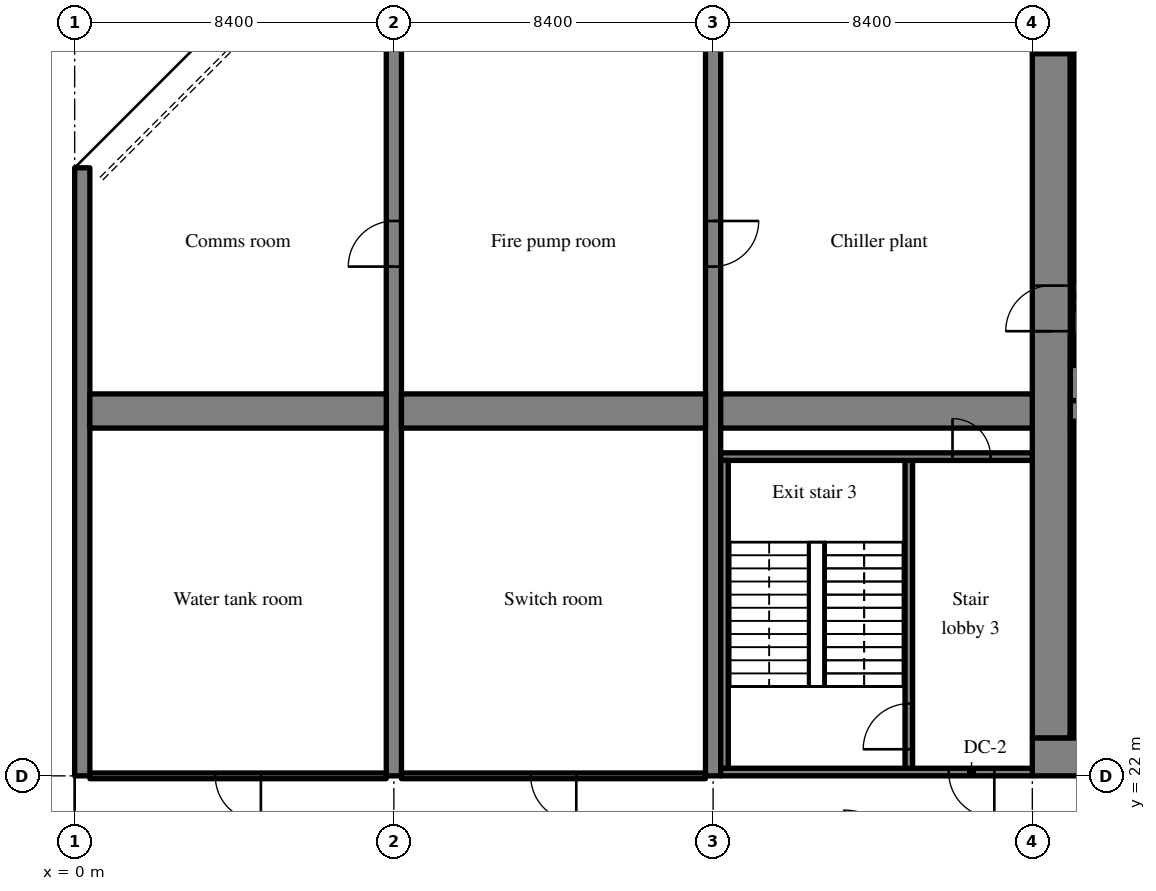
"""IFC4 building model, lengths in metres.
Left out: names, types, materials, properties, quantities, classifications, styles, units other than length and angle.
Written with IfcOpenShell. Run it as: python <this file> out.ifc"""

import sys

from ifc_helpers import new_model, si_unit, direction, frame, frame_2d, origin, place, context, subcontext, project, spatial, rectangle, extrude, source, transform, mapped, element, fill, save


model = new_model("IFC4")
c1 = context("Model", 3, precision=1e-05, world=origin(), true_north=direction((0.0, 1.0)))
c2 = subcontext(c1, "Body", "Model", "MODEL_VIEW")
j1 = project(units=[si_unit("LENGTHUNIT", "METRE"), si_unit("PLANEANGLEUNIT", "RADIAN")], contexts=[c1])
p1 = place(None, origin())
s1 = spatial("IfcSite", under=j1, at=p1, CompositionType="ELEMENT")
p2 = place(p1, origin())
s2 = spatial("IfcBuilding", under=s1, at=p2, CompositionType="ELEMENT")
p3 = place(p2, frame((0.0, 0.0, 81.0)))
s3 = spatial("IfcBuildingStorey", under=s2, at=p3, CompositionType="ELEMENT", Elevation=81.0)
m1 = source(origin(), c2, "Body", "SweptSolid", [
    extrude(rectangle(XDim=50.4, YDim=1.0, at=frame_2d((25.2, 0.0))), origin(), (0.0, 0.0, 1.0), 5.12),
])
p4 = place(p3, frame((25.2, 22.5, 0.0), z_axis=(0.0, 0.0, 1.0), x_axis=(1.0, 0.0, 0.0)))
e1 = element("IfcWall", 1, at=p4, inside=s3, PredefinedType="SHEAR", context=c2, shape_type="MappedRepresentation", body=[
    mapped(m1, transform((0.0, 0.0, 0.0), scale=1.0)),
])
m2 = source(origin(), c2, "Body", "SweptSolid", [
    extrude(rectangle(XDim=1.8, YDim=2.1, at=frame_2d((0.9, 1.05))), frame((0.0, 0.51, 0.0), z_axis=(0.0, -1.0, 0.0), x_axis=(1.0, 0.0, 0.0)), (0.0, 0.0, 1.0), 1.02),
])
p5 = place(p4, frame((15.9, 0.0, 0.0)))
e2 = element("IfcOpeningElement", 2, at=p5, cuts=e1, PredefinedType="OPENING", context=c2, shape_type="MappedRepresentation", body=[
    mapped(m2, transform((0.0, 0.0, 0.0), scale=1.0)),
])
m3 = source(origin(), c2, "Body", "SweptSolid", [
    extrude(rectangle(XDim=1.2, YDim=2.1, at=frame_2d((0.6, 1.05))), frame((0.0, 0.51, 0.0), z_axis=(0.0, -1.0, 0.0), x_axis=(1.0, 0.0, 0.0)), (0.0, 0.0, 1.0), 1.02),
])
p6 = place(p4, frame((26.987, 0.0, 0.0)))
e3 = element("IfcOpeningElement", 3, at=p6, cuts=e1, PredefinedType="OPENING", context=c2, shape_type="MappedRepresentation", body=[
    mapped(m3, transform((0.0, 0.0, 0.0), scale=1.0)),
])
m4 = source(origin(), c2, "Body", "SweptSolid", [
    extrude(rectangle(XDim=0.9, YDim=2.1, at=frame_2d((0.45, 1.05))), frame((0.0, 0.51, 0.0), z_axis=(0.0, -1.0, 0.0), x_axis=(1.0, 0.0, 0.0)), (0.0, 0.0, 1.0), 1.02),
])
p7 = place(p4, frame((33.75, 0.0, 0.0)))
e4 = element("IfcOpeningElement", 4, at=p7, cuts=e1, PredefinedType="OPENING", context=c2, shape_type="MappedRepresentation", body=[
    mapped(m4, transform((0.0, 0.0, 0.0), scale=1.0)),
])
p8 = place(p4, frame((30.75, 0.0, 0.0)))
e5 = element("IfcOpeningElement", 5, at=p8, cuts=e1, PredefinedType="OPENING", context=c2, shape_type="MappedRepresentation", body=[
    mapped(m4, transform((0.0, 0.0, 0.0), scale=1.0)),
])
p9 = place(p4, frame((38.262, 0.0, 0.0)))
e6 = element("IfcOpeningElement", 6, at=p9, cuts=e1, PredefinedType="OPENING", context=c2, shape_type="MappedRepresentation", body=[
    mapped(m4, transform((0.0, 0.0, 0.0), scale=1.0)),
])
p10 = place(p4, frame((6.438, 0.0, 0.0)))
e7 = element("IfcOpeningElement", 7, at=p10, cuts=e1, PredefinedType="OPENING", context=c2, shape_type="MappedRepresentation", body=[
    mapped(m3, transform((0.0, 0.0, 0.0), scale=1.0)),
])
p11 = place(p4, frame((47.725, 0.0, 0.0)))
e8 = element("IfcOpeningElement", 8, at=p11, cuts=e1, PredefinedType="OPENING", context=c2, shape_type="MappedRepresentation", body=[
    mapped(m3, transform((0.0, 0.0, 0.0), scale=1.0)),
])
p12 = place(p3, frame((25.2, 41.5, 0.0), z_axis=(0.0, 0.0, 1.0), x_axis=(1.0, 0.0, 0.0)))
e9 = element("IfcWall", 9, at=p12, inside=s3, PredefinedType="SHEAR", context=c2, shape_type="MappedRepresentation", body=[
    mapped(m1, transform((0.0, 0.0, 0.0), scale=1.0)),
])
m5 = source(origin(), c2, "Body", "SweptSolid", [
    extrude(rectangle(XDim=18.0, YDim=1.0, at=frame_2d((9.0, 0.0))), origin(), (0.0, 0.0, 1.0), 5.12),
])
p13 = place(p3, frame((25.7, 23.0, 0.0), z_axis=(0.0, 0.0, 1.0), x_axis=(0.0, 1.0, 0.0)))
e10 = element("IfcWall", 10, at=p13, inside=s3, PredefinedType="SHEAR", context=c2, shape_type="MappedRepresentation", body=[
    mapped(m5, transform((0.0, 0.0, 0.0), scale=1.0)),
])
p14 = place(p13, frame((10.7, 0.0, 0.0)))
e11 = element("IfcOpeningElement", 11, at=p14, cuts=e10, PredefinedType="OPENING", context=c2, shape_type="MappedRepresentation", body=[
    mapped(m3, transform((0.0, 0.0, 0.0), scale=1.0)),
])
m6 = source(origin(), c2, "Body", "SweptSolid", [
    extrude(rectangle(XDim=7.125, YDim=0.55, at=frame_2d((3.562, 0.0))), origin(), (0.0, 0.0, 1.0), 5.12),
])
p15 = place(p3, frame((26.2, 31.6, 0.0), z_axis=(0.0, 0.0, 1.0), x_axis=(1.0, 0.0, 0.0)))
e12 = element("IfcWall", 12, at=p15, inside=s3, PredefinedType="SHEAR", context=c2, shape_type="MappedRepresentation", body=[
    mapped(m6, transform((0.0, 0.0, 0.0), scale=1.0)),
])
m7 = source(origin(), c2, "Body", "SweptSolid", [
    extrude(rectangle(XDim=1.1, YDim=2.1, at=frame_2d((0.55, 1.05))), frame((0.0, 0.285, 0.0), z_axis=(0.0, -1.0, 0.0), x_axis=(1.0, 0.0, 0.0)), (0.0, 0.0, 1.0), 0.57),
])
p16 = place(p15, frame((5.488, 0.0, 0.0)))
e13 = element("IfcOpeningElement", 13, at=p16, cuts=e12, PredefinedType="OPENING", context=c2, shape_type="MappedRepresentation", body=[
    mapped(m7, transform((0.0, 0.0, 0.0), scale=1.0)),
])
m8 = source(origin(), c2, "Body", "SweptSolid", [
    extrude(rectangle(XDim=16.0, YDim=0.4, at=frame_2d((8.0, 0.0))), origin(), (0.0, 0.0, 1.0), 5.12),
])
p17 = place(p3, frame((0.2, 22.0, 0.0), z_axis=(0.0, 0.0, 1.0), x_axis=(0.0, 1.0, 0.0)))
e14 = element("IfcWall", 14, at=p17, inside=s3, PredefinedType="SHEAR", context=c2, shape_type="MappedRepresentation", body=[
    mapped(m8, transform((0.0, 0.0, 0.0), scale=1.0)),
])
m9 = source(origin(), c2, "Body", "SweptSolid", [
    extrude(rectangle(XDim=20.0, YDim=0.4, at=frame_2d((10.0, 0.0))), origin(), (0.0, 0.0, 1.0), 5.12),
])
p18 = place(p3, frame((8.4, 22.0, 0.0), z_axis=(0.0, 0.0, 1.0), x_axis=(0.0, 1.0, 0.0)))
e15 = element("IfcWall", 15, at=p18, inside=s3, PredefinedType="SHEAR", context=c2, shape_type="MappedRepresentation", body=[
    mapped(m9, transform((0.0, 0.0, 0.0), scale=1.0)),
])
m10 = source(origin(), c2, "Body", "SweptSolid", [
    extrude(rectangle(XDim=1.2, YDim=2.1, at=frame_2d((0.6, 1.05))), frame((0.0, 0.21, 0.0), z_axis=(0.0, -1.0, 0.0), x_axis=(1.0, 0.0, 0.0)), (0.0, 0.0, 1.0), 0.42),
])
p19 = place(p18, frame((13.4, 0.0, 0.0)))
e16 = element("IfcOpeningElement", 16, at=p19, cuts=e15, PredefinedType="OPENING", context=c2, shape_type="MappedRepresentation", body=[
    mapped(m10, transform((0.0, 0.0, 0.0), scale=1.0)),
])
p20 = place(p3, frame((16.8, 22.0, 0.0), z_axis=(0.0, 0.0, 1.0), x_axis=(0.0, 1.0, 0.0)))
e17 = element("IfcWall", 17, at=p20, inside=s3, PredefinedType="SHEAR", context=c2, shape_type="MappedRepresentation", body=[
    mapped(m9, transform((0.0, 0.0, 0.0), scale=1.0)),
])
p21 = place(p20, frame((13.4, 0.0, 0.0)))
e18 = element("IfcOpeningElement", 18, at=p21, cuts=e17, PredefinedType="OPENING", context=c2, shape_type="MappedRepresentation", body=[
    mapped(m10, transform((0.0, 0.0, 0.0), scale=1.0)),
])
m11 = source(origin(), c2, "Body", "SweptSolid", [
    extrude(rectangle(XDim=7.8, YDim=0.9, at=frame_2d((3.9, 0.0))), origin(), (0.0, 0.0, 1.0), 5.12),
])
p22 = place(p3, frame((0.4, 31.6, 0.0), z_axis=(0.0, 0.0, 1.0), x_axis=(1.0, 0.0, 0.0)))
e19 = element("IfcWall", 19, at=p22, inside=s3, PredefinedType="SHEAR", context=c2, shape_type="MappedRepresentation", body=[
    mapped(m11, transform((0.0, 0.0, 0.0), scale=1.0)),
])
m12 = source(origin(), c2, "Body", "SweptSolid", [
    extrude(rectangle(XDim=8.0, YDim=0.9, at=frame_2d((4.0, 0.0))), origin(), (0.0, 0.0, 1.0), 5.12),
])
p23 = place(p3, frame((8.6, 31.6, 0.0), z_axis=(0.0, 0.0, 1.0), x_axis=(1.0, 0.0, 0.0)))
e20 = element("IfcWall", 20, at=p23, inside=s3, PredefinedType="SHEAR", context=c2, shape_type="MappedRepresentation", body=[
    mapped(m12, transform((0.0, 0.0, 0.0), scale=1.0)),
])
m13 = source(origin(), c2, "Body", "SweptSolid", [
    extrude(rectangle(XDim=8.2, YDim=0.9, at=frame_2d((4.1, 0.0))), origin(), (0.0, 0.0, 1.0), 5.12),
])
p24 = place(p3, frame((17.0, 31.6, 0.0), z_axis=(0.0, 0.0, 1.0), x_axis=(1.0, 0.0, 0.0)))
e21 = element("IfcWall", 21, at=p24, inside=s3, PredefinedType="SHEAR", context=c2, shape_type="MappedRepresentation", body=[
    mapped(m13, transform((0.0, 0.0, 0.0), scale=1.0)),
])
m14 = source(origin(), c2, "Body", "SweptSolid", [
    extrude(rectangle(XDim=8.3, YDim=0.2, at=frame_2d((4.15, 0.0))), origin(), (0.0, 0.0, 1.0), 5.12),
])
p25 = place(p3, frame((21.95, 22.1, 0.0), z_axis=(0.0, 0.0, 1.0), x_axis=(0.0, 1.0, 0.0)))
e22 = element("IfcWall", 22, at=p25, inside=s3, PredefinedType="SOLIDWALL", context=c2, shape_type="MappedRepresentation", body=[
    mapped(m14, transform((0.0, 0.0, 0.0), scale=1.0)),
])
m15 = source(origin(), c2, "Body", "SweptSolid", [
    extrude(rectangle(XDim=1.2, YDim=2.1, at=frame_2d((0.6, 1.05))), frame((0.0, 0.11, 0.0), z_axis=(0.0, -1.0, 0.0), x_axis=(1.0, 0.0, 0.0)), (0.0, 0.0, 1.0), 0.22),
])
p26 = place(p25, frame((0.6, 0.0, 0.0)))
e23 = element("IfcOpeningElement", 23, at=p26, cuts=e22, PredefinedType="OPENING", context=c2, shape_type="MappedRepresentation", body=[
    mapped(m15, transform((0.0, 0.0, 0.0), scale=1.0)),
])
m16 = source(origin(), c2, "Body", "SweptSolid", [
    extrude(rectangle(XDim=8.2, YDim=0.2, at=frame_2d((4.1, 0.0))), origin(), (0.0, 0.0, 1.0), 5.12),
])
p27 = place(p3, frame((17.0, 22.1, 0.0), z_axis=(0.0, 0.0, 1.0), x_axis=(1.0, 0.0, 0.0)))
e24 = element("IfcWall", 24, at=p27, inside=s3, PredefinedType="SOLIDWALL", context=c2, shape_type="MappedRepresentation", body=[
    mapped(m16, transform((0.0, 0.0, 0.0), scale=1.0)),
])
p28 = place(p27, frame((6.0, 0.0, 0.0)))
e25 = element("IfcOpeningElement", 25, at=p28, cuts=e24, PredefinedType="OPENING", context=c2, shape_type="MappedRepresentation", body=[
    mapped(m15, transform((0.0, 0.0, 0.0), scale=1.0)),
])
p29 = place(p3, frame((25.2, 30.4, 0.0), z_axis=(0.0, 0.0, 1.0), x_axis=(-1.0, 0.0, 0.0)))
e26 = element("IfcWall", 26, at=p29, inside=s3, PredefinedType="SOLIDWALL", context=c2, shape_type="MappedRepresentation", body=[
    mapped(m16, transform((0.0, 0.0, 0.0), scale=1.0)),
])
m17 = source(origin(), c2, "Body", "SweptSolid", [
    extrude(rectangle(XDim=1.0, YDim=2.1, at=frame_2d((0.5, 1.05))), frame((0.0, 0.11, 0.0), z_axis=(0.0, -1.0, 0.0), x_axis=(1.0, 0.0, 0.0)), (0.0, 0.0, 1.0), 0.22),
])
p30 = place(p29, frame((1.1, 0.0, 0.0)))
e27 = element("IfcOpeningElement", 27, at=p30, cuts=e26, PredefinedType="OPENING", context=c2, shape_type="MappedRepresentation", body=[
    mapped(m17, transform((0.0, 0.0, 0.0), scale=1.0)),
])
m18 = source(origin(), c2, "Body", "SweptSolid", [
    extrude(rectangle(XDim=4.75, YDim=0.1, at=frame_2d((2.375, 0.0))), origin(), (0.0, 0.0, 1.0), 5.12),
])
p31 = place(p3, frame((26.2, 23.05, 0.0), z_axis=(0.0, 0.0, 1.0), x_axis=(1.0, 0.0, 0.0)))
e28 = element("IfcWall", 28, at=p31, inside=s3, PredefinedType="SOLIDWALL", context=c2, shape_type="MappedRepresentation", body=[
    mapped(m18, transform((0.0, 0.0, 0.0), scale=1.0)),
])
m19 = source(origin(), c2, "Body", "SweptSolid", [
    extrude(rectangle(XDim=4.75, YDim=0.125, at=frame_2d((2.375, 0.0))), origin(), (0.0, 0.0, 1.0), 5.12),
])
p32 = place(p3, frame((26.2, 31.262, 0.0), z_axis=(0.0, 0.0, 1.0), x_axis=(1.0, 0.0, 0.0)))
e29 = element("IfcWall", 29, at=p32, inside=s3, PredefinedType="SOLIDWALL", context=c2, shape_type="MappedRepresentation", body=[
    mapped(m19, transform((0.0, 0.0, 0.0), scale=1.0)),
])
m20 = source(origin(), c2, "Body", "SweptSolid", [
    extrude(rectangle(XDim=8.1, YDim=0.1, at=frame_2d((4.05, 0.0))), origin(), (0.0, 0.0, 1.0), 5.12),
])
p33 = place(p3, frame((26.25, 23.1, 0.0), z_axis=(0.0, 0.0, 1.0), x_axis=(0.0, 1.0, 0.0)))
e30 = element("IfcWall", 30, at=p33, inside=s3, PredefinedType="SOLIDWALL", context=c2, shape_type="MappedRepresentation", body=[
    mapped(m20, transform((0.0, 0.0, 0.0), scale=1.0)),
])
m21 = source(origin(), c2, "Body", "SweptSolid", [
    extrude(rectangle(XDim=8.1, YDim=0.2, at=frame_2d((4.05, 0.0))), origin(), (0.0, 0.0, 1.0), 5.12),
])
p34 = place(p3, frame((17.1, 22.2, 0.0), z_axis=(0.0, 0.0, 1.0), x_axis=(0.0, 1.0, 0.0)))
e31 = element("IfcWall", 31, at=p34, inside=s3, PredefinedType="SOLIDWALL", context=c2, shape_type="MappedRepresentation", body=[
    mapped(m21, transform((0.0, 0.0, 0.0), scale=1.0)),
])
p35 = place(p3, frame((26.2, 40.95, 0.0), z_axis=(0.0, 0.0, 1.0), x_axis=(1.0, 0.0, 0.0)))
e32 = element("IfcWall", 32, at=p35, inside=s3, PredefinedType="SOLIDWALL", context=c2, shape_type="MappedRepresentation", body=[
    mapped(m18, transform((0.0, 0.0, 0.0), scale=1.0)),
])
m22 = source(origin(), c2, "Body", "SweptSolid", [
    extrude(rectangle(XDim=4.75, YDim=0.925, at=frame_2d((2.375, 0.0))), origin(), (0.0, 0.0, 1.0), 5.12),
])
p36 = place(p3, frame((26.2, 32.337, 0.0), z_axis=(0.0, 0.0, 1.0), x_axis=(1.0, 0.0, 0.0)))
e33 = element("IfcWall", 33, at=p36, inside=s3, PredefinedType="SOLIDWALL", context=c2, shape_type="MappedRepresentation", body=[
    mapped(m22, transform((0.0, 0.0, 0.0), scale=1.0)),
])
m23 = source(origin(), c2, "Body", "SweptSolid", [
    extrude(rectangle(XDim=0.8, YDim=0.1, at=frame_2d((0.4, 0.0))), origin(), (0.0, 0.0, 1.0), 5.12),
])
p37 = place(p3, frame((26.25, 32.8, 0.0), z_axis=(0.0, 0.0, 1.0), x_axis=(0.0, 1.0, 0.0)))
e34 = element("IfcWall", 34, at=p37, inside=s3, PredefinedType="SOLIDWALL", context=c2, shape_type="MappedRepresentation", body=[
    mapped(m23, transform((0.0, 0.0, 0.0), scale=1.0)),
])
m24 = source(origin(), c2, "Body", "SweptSolid", [
    extrude(rectangle(XDim=5.9, YDim=0.1, at=frame_2d((2.95, 0.0))), origin(), (0.0, 0.0, 1.0), 5.12),
])
p38 = place(p3, frame((26.25, 35.0, 0.0), z_axis=(0.0, 0.0, 1.0), x_axis=(0.0, 1.0, 0.0)))
e35 = element("IfcWall", 35, at=p38, inside=s3, PredefinedType="SOLIDWALL", context=c2, shape_type="MappedRepresentation", body=[
    mapped(m24, transform((0.0, 0.0, 0.0), scale=1.0)),
])
m25 = source(origin(), c2, "Body", "SweptSolid", [
    extrude(rectangle(XDim=7.8, YDim=0.15, at=frame_2d((3.9, 0.0))), origin(), (0.0, 0.0, 1.0), 4.37),
])
p39 = place(p3, frame((0.4, 22.0, 0.0), z_axis=(0.0, 0.0, 1.0), x_axis=(1.0, 0.0, 0.0)))
e36 = element("IfcWall", 36, at=p39, inside=s3, PredefinedType="PARTITIONING", context=c2, shape_type="MappedRepresentation", body=[
    mapped(m25, transform((0.0, 0.0, 0.0), scale=1.0)),
])
m26 = source(origin(), c2, "Body", "SweptSolid", [
    extrude(rectangle(XDim=1.2, YDim=2.1, at=frame_2d((0.6, 1.05))), frame((0.0, 0.085, 0.0), z_axis=(0.0, -1.0, 0.0), x_axis=(1.0, 0.0, 0.0)), (0.0, 0.0, 1.0), 0.17),
])
p40 = place(p39, frame((3.3, 0.0, 0.0)))
e37 = element("IfcOpeningElement", 37, at=p40, cuts=e36, PredefinedType="OPENING", context=c2, shape_type="MappedRepresentation", body=[
    mapped(m26, transform((0.0, 0.0, 0.0), scale=1.0)),
])
m27 = source(origin(), c2, "Body", "SweptSolid", [
    extrude(rectangle(XDim=8.0, YDim=0.15, at=frame_2d((4.0, 0.0))), origin(), (0.0, 0.0, 1.0), 4.37),
])
p41 = place(p3, frame((8.6, 22.0, 0.0), z_axis=(0.0, 0.0, 1.0), x_axis=(1.0, 0.0, 0.0)))
e38 = element("IfcWall", 38, at=p41, inside=s3, PredefinedType="PARTITIONING", context=c2, shape_type="MappedRepresentation", body=[
    mapped(m27, transform((0.0, 0.0, 0.0), scale=1.0)),
])
p42 = place(p41, frame((3.4, 0.0, 0.0)))
e39 = element("IfcOpeningElement", 39, at=p42, cuts=e38, PredefinedType="OPENING", context=c2, shape_type="MappedRepresentation", body=[
    mapped(m26, transform((0.0, 0.0, 0.0), scale=1.0)),
])
m28 = source(origin(), c2, "Body", "SweptSolid", [
    extrude(rectangle(XDim=1.2, YDim=2.1, at=frame_2d((0.6, 1.05))), frame((0.0, 0.025, 0.0), z_axis=(0.0, -1.0, 0.0), x_axis=(1.0, 0.0, 0.0)), (0.0, 0.0, 1.0), 0.05),
])
p43 = place(p26, origin())
e40 = element("IfcDoor", 40, at=p43, inside=s3, OperationType="SINGLE_SWING_LEFT", PredefinedType="DOOR", context=c2, shape_type="MappedRepresentation", body=[
    mapped(m28, transform((0.0, 0.0, 0.0), scale=1.0)),
])
fill(e23, e40)
p44 = place(p28, origin())
e41 = element("IfcDoor", 41, at=p44, inside=s3, OperationType="SINGLE_SWING_RIGHT", PredefinedType="DOOR", context=c2, shape_type="MappedRepresentation", body=[
    mapped(m28, transform((0.0, 0.0, 0.0), scale=1.0)),
])
fill(e25, e41)
m29 = source(origin(), c2, "Body", "SweptSolid", [
    extrude(rectangle(XDim=1.0, YDim=2.1, at=frame_2d((0.5, 1.05))), frame((0.0, 0.025, 0.0), z_axis=(0.0, -1.0, 0.0), x_axis=(1.0, 0.0, 0.0)), (0.0, 0.0, 1.0), 0.05),
])
p45 = place(p30, origin())
e42 = element("IfcDoor", 42, at=p45, inside=s3, OperationType="SINGLE_SWING_RIGHT", PredefinedType="DOOR", context=c2, shape_type="MappedRepresentation", body=[
    mapped(m29, transform((0.0, 0.0, 0.0), scale=1.0)),
])
fill(e27, e42)
p46 = place(p40, origin())
e43 = element("IfcDoor", 43, at=p46, inside=s3, OperationType="SINGLE_SWING_RIGHT", PredefinedType="DOOR", context=c2, shape_type="MappedRepresentation", body=[
    mapped(m28, transform((0.0, 0.0, 0.0), scale=1.0)),
])
fill(e37, e43)
p47 = place(p42, origin())
e44 = element("IfcDoor", 44, at=p47, inside=s3, OperationType="SINGLE_SWING_RIGHT", PredefinedType="DOOR", context=c2, shape_type="MappedRepresentation", body=[
    mapped(m28, transform((0.0, 0.0, 0.0), scale=1.0)),
])
fill(e39, e44)
p48 = place(p14, origin())
e45 = element("IfcDoor", 45, at=p48, inside=s3, OperationType="SINGLE_SWING_LEFT", PredefinedType="DOOR", context=c2, shape_type="MappedRepresentation", body=[
    mapped(m28, transform((0.0, 0.0, 0.0), scale=1.0)),
])
fill(e11, e45)
p49 = place(p19, origin())
e46 = element("IfcDoor", 46, at=p49, inside=s3, OperationType="SINGLE_SWING_LEFT", PredefinedType="DOOR", context=c2, shape_type="MappedRepresentation", body=[
    mapped(m28, transform((0.0, 0.0, 0.0), scale=1.0)),
])
fill(e16, e46)
p50 = place(p21, origin())
e47 = element("IfcDoor", 47, at=p50, inside=s3, OperationType="SINGLE_SWING_RIGHT", PredefinedType="DOOR", context=c2, shape_type="MappedRepresentation", body=[
    mapped(m28, transform((0.0, 0.0, 0.0), scale=1.0)),
])
fill(e18, e47)
save(model, sys.argv[1])
